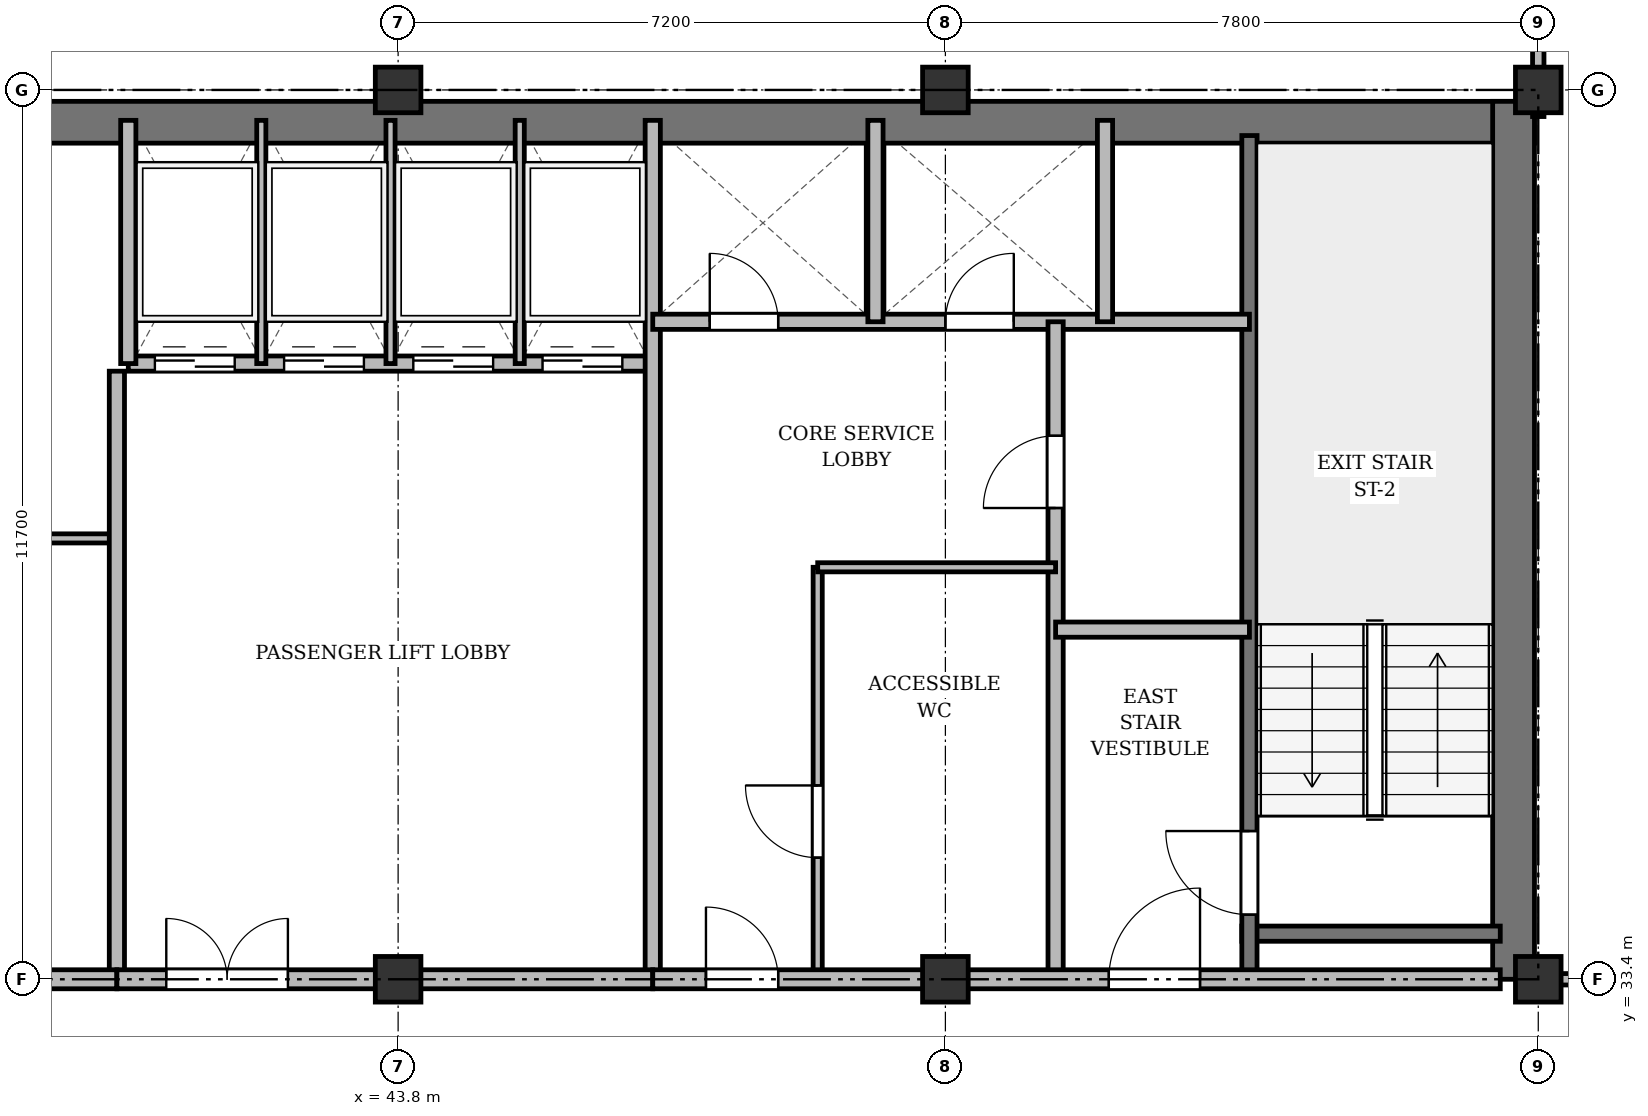
"""IFC4 building model, lengths in metres.
Left out: names, types, materials, properties, quantities, classifications, styles, units other than length and angle.
Written with IfcOpenShell. Run it as: python <this file> out.ifc"""

import sys

from ifc_helpers import new_model, si_unit, direction, frame, frame_2d, origin, origin_2d, place, context, subcontext, project, spatial, rectangle, extrude, source, transform, mapped, element, fill, save


model = new_model("IFC4")
c1 = context("Model", 3, precision=1e-05, world=origin(), true_north=direction((0.0, 1.0)))
c2 = subcontext(c1, "Body", "Model", "MODEL_VIEW")
j1 = project(units=[si_unit("LENGTHUNIT", "METRE"), si_unit("PLANEANGLEUNIT", "RADIAN")], contexts=[c1])
p1 = place(None, origin())
s1 = spatial("IfcSite", under=j1, at=p1, CompositionType="ELEMENT")
p2 = place(p1, origin())
s2 = spatial("IfcBuilding", under=s1, at=p2, CompositionType="ELEMENT")
p3 = place(p2, frame((0.0, 0.0, 248.7)))
s3 = spatial("IfcBuildingStorey", under=s2, at=p3, CompositionType="ELEMENT", Elevation=248.7)
m1 = source(origin(), c2, "Body", "SweptSolid", [
    extrude(rectangle(XDim=0.6, YDim=0.6, at=origin_2d()), origin(), (0.0, 0.0, 1.0), 3.6),
])
for number, where, z_axis, x_axis in (
    (1, (43.8, 33.4, 0.0), (0.0, 0.0, 1.0), (1.0, 0.0, 0.0)),
    (2, (43.8, 45.1, 0.0), (0.0, 0.0, 1.0), (1.0, 0.0, 0.0)),
    (3, (51.0, 33.4, 0.0), (0.0, 0.0, 1.0), (1.0, 0.0, 0.0)),
    (4, (51.0, 45.1, 0.0), (0.0, 0.0, 1.0), (1.0, 0.0, 0.0)),
    (5, (58.8, 33.4, 0.0), (0.0, 0.0, 1.0), (1.0, 0.0, 0.0)),
    (6, (58.8, 45.1, 0.0), (0.0, 0.0, 1.0), (1.0, 0.0, 0.0)),
):
    element("IfcColumn", number, at=place(p3, frame(where, z_axis=z_axis, x_axis=x_axis)), inside=s3, PredefinedType="COLUMN", context=c2, shape_type="MappedRepresentation", body=[
        mapped(m1, transform((0.0, 0.0, 0.0), x_axis=(1.0, 0.0, 0.0), y_axis=(0.0, 1.0, 0.0), z_axis=(0.0, 0.0, 1.0), scale=1.0)),
    ])
p4 = place(p3, frame((15.65, 44.675, 0.0), z_axis=(0.0, 0.0, 1.0), x_axis=(1.0, 0.0, 0.0)))
e7 = element("IfcWall", 7, at=p4, inside=s3, PredefinedType="SHEAR", context=c2, shape_type="SweptSolid", body=[
    extrude(rectangle(XDim=43.1, YDim=0.55, at=frame_2d((21.55, 0.0))), origin(), (0.0, 0.0, 1.0), 3.37),
])
p5 = place(p3, frame((58.475, 33.4, 0.0), z_axis=(0.0, 0.0, 1.0), x_axis=(0.0, 1.0, 0.0)))
e8 = element("IfcWall", 8, at=p5, inside=s3, PredefinedType="SHEAR", context=c2, shape_type="SweptSolid", body=[
    extrude(rectangle(XDim=11.55, YDim=0.55, at=frame_2d((5.775, 0.0))), origin(), (0.0, 0.0, 1.0), 3.37),
])
p6 = place(p3, frame((54.9, 34.0, 0.0), z_axis=(0.0, 0.0, 1.0), x_axis=(1.0, 0.0, 0.0)))
e9 = element("IfcWall", 9, at=p6, inside=s3, PredefinedType="SHEAR", context=c2, shape_type="SweptSolid", body=[
    extrude(rectangle(XDim=3.4, YDim=0.2, at=frame_2d((1.7, 0.0))), origin(), (0.0, 0.0, 1.0), 3.37),
])
p7 = place(p3, frame((55.0, 33.4, 0.0), z_axis=(0.0, 0.0, 1.0), x_axis=(0.0, 1.0, 0.0)))
e10 = element("IfcWall", 10, at=p7, inside=s3, PredefinedType="SHEAR", context=c2, shape_type="SweptSolid", body=[
    extrude(rectangle(XDim=11.1, YDim=0.2, at=frame_2d((5.55, 0.0))), origin(), (0.0, 0.0, 1.0), 3.37),
])
p8 = place(p7, frame((0.85, 0.0, 0.0)))
e11 = element("IfcOpeningElement", 11, at=p8, cuts=e10, PredefinedType="OPENING", context=c2, shape_type="SweptSolid", body=[
    extrude(rectangle(XDim=1.1, YDim=2.15, at=frame_2d((0.55, 1.075))), frame((0.0, 0.11, 0.0), z_axis=(0.0, -1.0, 0.0), x_axis=(1.0, 0.0, 0.0)), (0.0, 0.0, 1.0), 0.22),
])
p9 = place(p3, frame((33.3, 39.2, 0.0), z_axis=(0.0, 0.0, 1.0), x_axis=(1.0, 0.0, 0.0)))
e12 = element("IfcWall", 12, at=p9, inside=s3, PredefinedType="PARTITIONING", context=c2, shape_type="SweptSolid", body=[
    extrude(rectangle(XDim=6.8, YDim=0.12, at=frame_2d((3.4, 0.0))), origin(), (0.0, 0.0, 1.0), 3.37),
])
p10 = place(p9, frame((2.6, 0.0, 0.0)))
e13 = element("IfcOpeningElement", 13, at=p10, cuts=e12, PredefinedType="OPENING", context=c2, shape_type="SweptSolid", body=[
    extrude(rectangle(XDim=0.95, YDim=2.15, at=frame_2d((0.475, 1.075))), frame((0.0, 0.07, 0.0), z_axis=(0.0, -1.0, 0.0), x_axis=(1.0, 0.0, 0.0)), (0.0, 0.0, 1.0), 0.14),
])
p11 = place(p3, frame((40.1, 33.4, 0.0), z_axis=(0.0, 0.0, 1.0), x_axis=(0.0, 1.0, 0.0)))
e14 = element("IfcWall", 14, at=p11, inside=s3, PredefinedType="SOLIDWALL", context=c2, shape_type="SweptSolid", body=[
    extrude(rectangle(XDim=8.0, YDim=0.2, at=frame_2d((4.0, 0.0))), origin(), (0.0, 0.0, 1.0), 2.92),
])
p12 = place(p3, frame((40.25, 41.5, 0.0), z_axis=(0.0, 0.0, 1.0), x_axis=(1.0, 0.0, 0.0)))
e15 = element("IfcWall", 15, at=p12, inside=s3, PredefinedType="SOLIDWALL", context=c2, shape_type="SweptSolid", body=[
    extrude(rectangle(XDim=6.9, YDim=0.2, at=frame_2d((3.45, 0.0))), origin(), (0.0, 0.0, 1.0), 3.37),
])
p13 = place(p12, frame((0.35, 0.0, 0.0)))
e16 = element("IfcOpeningElement", 16, at=p13, cuts=e15, PredefinedType="OPENING", context=c2, shape_type="SweptSolid", body=[
    extrude(rectangle(XDim=1.05, YDim=2.15, at=frame_2d((0.525, 1.075))), frame((0.0, 0.11, 0.0), z_axis=(0.0, -1.0, 0.0), x_axis=(1.0, 0.0, 0.0)), (0.0, 0.0, 1.0), 0.22),
])
p14 = place(p12, frame((2.05, 0.0, 0.0)))
e17 = element("IfcOpeningElement", 17, at=p14, cuts=e15, PredefinedType="OPENING", context=c2, shape_type="SweptSolid", body=[
    extrude(rectangle(XDim=1.05, YDim=2.15, at=frame_2d((0.525, 1.075))), frame((0.0, 0.11, 0.0), z_axis=(0.0, -1.0, 0.0), x_axis=(1.0, 0.0, 0.0)), (0.0, 0.0, 1.0), 0.22),
])
p15 = place(p12, frame((3.75, 0.0, 0.0)))
e18 = element("IfcOpeningElement", 18, at=p15, cuts=e15, PredefinedType="OPENING", context=c2, shape_type="SweptSolid", body=[
    extrude(rectangle(XDim=1.05, YDim=2.15, at=frame_2d((0.525, 1.075))), frame((0.0, 0.11, 0.0), z_axis=(0.0, -1.0, 0.0), x_axis=(1.0, 0.0, 0.0)), (0.0, 0.0, 1.0), 0.22),
])
p16 = place(p12, frame((5.45, 0.0, 0.0)))
e19 = element("IfcOpeningElement", 19, at=p16, cuts=e15, PredefinedType="OPENING", context=c2, shape_type="SweptSolid", body=[
    extrude(rectangle(XDim=1.05, YDim=2.15, at=frame_2d((0.525, 1.075))), frame((0.0, 0.11, 0.0), z_axis=(0.0, -1.0, 0.0), x_axis=(1.0, 0.0, 0.0)), (0.0, 0.0, 1.0), 0.22),
])
p17 = place(p3, frame((40.25, 41.5, 0.0), z_axis=(0.0, 0.0, 1.0), x_axis=(0.0, 1.0, 0.0)))
e20 = element("IfcWall", 20, at=p17, inside=s3, PredefinedType="SOLIDWALL", context=c2, shape_type="SweptSolid", body=[
    extrude(rectangle(XDim=3.2, YDim=0.2, at=frame_2d((1.6, 0.0))), origin(), (0.0, 0.0, 1.0), 3.37),
])
for number, where, z_axis, x_axis in (
    (21, (42.0, 41.5, 0.0), (0.0, 0.0, 1.0), (0.0, 1.0, 0.0)),
    (22, (43.7, 41.5, 0.0), (0.0, 0.0, 1.0), (0.0, 1.0, 0.0)),
    (23, (45.4, 41.5, 0.0), (0.0, 0.0, 1.0), (0.0, 1.0, 0.0)),
):
    element("IfcWall", number, at=place(p3, frame(where, z_axis=z_axis, x_axis=x_axis)), inside=s3, PredefinedType="PARTITIONING", context=c2, shape_type="SweptSolid", body=[
        extrude(rectangle(XDim=3.2, YDim=0.12, at=frame_2d((1.6, 0.0))), origin(), (0.0, 0.0, 1.0), 3.37),
    ])
p18 = place(p3, frame((47.15, 33.4, 0.0), z_axis=(0.0, 0.0, 1.0), x_axis=(0.0, 1.0, 0.0)))
e24 = element("IfcWall", 24, at=p18, inside=s3, PredefinedType="SOLIDWALL", context=c2, shape_type="SweptSolid", body=[
    extrude(rectangle(XDim=11.3, YDim=0.2, at=frame_2d((5.65, 0.0))), origin(), (0.0, 0.0, 1.0), 2.92),
])
p19 = place(p3, frame((33.3, 33.4, 0.0), z_axis=(0.0, 0.0, 1.0), x_axis=(1.0, 0.0, 0.0)))
e25 = element("IfcWall", 25, at=p19, inside=s3, PredefinedType="PARTITIONING", context=c2, shape_type="SweptSolid", body=[
    extrude(rectangle(XDim=6.8, YDim=0.25, at=frame_2d((3.4, 0.0))), origin(), (0.0, 0.0, 1.0), 2.92),
])
p20 = place(p19, frame((2.4, 0.0, 0.0)))
e26 = element("IfcOpeningElement", 26, at=p20, cuts=e25, PredefinedType="OPENING", context=c2, shape_type="SweptSolid", body=[
    extrude(rectangle(XDim=1.0, YDim=2.15, at=frame_2d((0.5, 1.075))), frame((0.0, 0.135, 0.0), z_axis=(0.0, -1.0, 0.0), x_axis=(1.0, 0.0, 0.0)), (0.0, 0.0, 1.0), 0.27),
])
p21 = place(p3, frame((40.1, 33.4, 0.0), z_axis=(0.0, 0.0, 1.0), x_axis=(1.0, 0.0, 0.0)))
e27 = element("IfcWall", 27, at=p21, inside=s3, PredefinedType="PARTITIONING", context=c2, shape_type="SweptSolid", body=[
    extrude(rectangle(XDim=7.05, YDim=0.25, at=frame_2d((3.525, 0.0))), origin(), (0.0, 0.0, 1.0), 2.92),
])
p22 = place(p21, frame((0.65, 0.0, 0.0)))
e28 = element("IfcOpeningElement", 28, at=p22, cuts=e27, PredefinedType="OPENING", context=c2, shape_type="SweptSolid", body=[
    extrude(rectangle(XDim=1.6, YDim=2.2, at=frame_2d((0.8, 1.1))), frame((0.0, 0.135, 0.0), z_axis=(0.0, -1.0, 0.0), x_axis=(1.0, 0.0, 0.0)), (0.0, 0.0, 1.0), 0.27),
])
p23 = place(p3, frame((47.15, 42.05, 0.0), z_axis=(0.0, 0.0, 1.0), x_axis=(1.0, 0.0, 0.0)))
e29 = element("IfcWall", 29, at=p23, inside=s3, PredefinedType="SOLIDWALL", context=c2, shape_type="SweptSolid", body=[
    extrude(rectangle(XDim=7.85, YDim=0.2, at=frame_2d((3.925, 0.0))), origin(), (0.0, 0.0, 1.0), 2.87),
])
p24 = place(p23, frame((0.75, 0.0, 0.0)))
e30 = element("IfcOpeningElement", 30, at=p24, cuts=e29, PredefinedType="OPENING", context=c2, shape_type="SweptSolid", body=[
    extrude(rectangle(XDim=0.9, YDim=2.1, at=frame_2d((0.45, 1.05))), frame((0.0, 0.11, 0.0), z_axis=(0.0, -1.0, 0.0), x_axis=(1.0, 0.0, 0.0)), (0.0, 0.0, 1.0), 0.22),
])
p25 = place(p23, frame((3.85, 0.0, 0.0)))
e31 = element("IfcOpeningElement", 31, at=p25, cuts=e29, PredefinedType="OPENING", context=c2, shape_type="SweptSolid", body=[
    extrude(rectangle(XDim=0.9, YDim=2.1, at=frame_2d((0.45, 1.05))), frame((0.0, 0.11, 0.0), z_axis=(0.0, -1.0, 0.0), x_axis=(1.0, 0.0, 0.0)), (0.0, 0.0, 1.0), 0.22),
])
for number, where, z_axis, x_axis in (
    (32, (50.08, 42.05, 0.0), (0.0, 0.0, 1.0), (0.0, 1.0, 0.0)),
    (33, (53.1, 42.05, 0.0), (0.0, 0.0, 1.0), (0.0, 1.0, 0.0)),
):
    element("IfcWall", number, at=place(p3, frame(where, z_axis=z_axis, x_axis=x_axis)), inside=s3, PredefinedType="SOLIDWALL", context=c2, shape_type="SweptSolid", body=[
        extrude(rectangle(XDim=2.65, YDim=0.2, at=frame_2d((1.325, 0.0))), origin(), (0.0, 0.0, 1.0), 3.37),
    ])
p26 = place(p3, frame((52.45, 33.4, 0.0), z_axis=(0.0, 0.0, 1.0), x_axis=(0.0, 1.0, 0.0)))
e34 = element("IfcWall", 34, at=p26, inside=s3, PredefinedType="PARTITIONING", context=c2, shape_type="SweptSolid", body=[
    extrude(rectangle(XDim=8.65, YDim=0.2, at=frame_2d((4.325, 0.0))), origin(), (0.0, 0.0, 1.0), 2.92),
])
p27 = place(p26, frame((6.2, 0.0, 0.0)))
e35 = element("IfcOpeningElement", 35, at=p27, cuts=e34, PredefinedType="OPENING", context=c2, shape_type="SweptSolid", body=[
    extrude(rectangle(XDim=0.95, YDim=2.15, at=frame_2d((0.475, 1.075))), frame((0.0, 0.11, 0.0), z_axis=(0.0, -1.0, 0.0), x_axis=(1.0, 0.0, 0.0)), (0.0, 0.0, 1.0), 0.22),
])
p28 = place(p3, frame((52.45, 38.0, 0.0), z_axis=(0.0, 0.0, 1.0), x_axis=(1.0, 0.0, 0.0)))
e36 = element("IfcWall", 36, at=p28, inside=s3, PredefinedType="PARTITIONING", context=c2, shape_type="SweptSolid", body=[
    extrude(rectangle(XDim=2.55, YDim=0.2, at=frame_2d((1.275, 0.0))), origin(), (0.0, 0.0, 1.0), 3.37),
])
p29 = place(p3, frame((49.32, 33.4, 0.0), z_axis=(0.0, 0.0, 1.0), x_axis=(0.0, 1.0, 0.0)))
e37 = element("IfcWall", 37, at=p29, inside=s3, PredefinedType="PARTITIONING", context=c2, shape_type="SweptSolid", body=[
    extrude(rectangle(XDim=5.42, YDim=0.12, at=frame_2d((2.71, 0.0))), origin(), (0.0, 0.0, 1.0), 2.92),
])
p30 = place(p29, frame((1.6, 0.0, 0.0)))
e38 = element("IfcOpeningElement", 38, at=p30, cuts=e37, PredefinedType="OPENING", context=c2, shape_type="SweptSolid", body=[
    extrude(rectangle(XDim=0.95, YDim=2.15, at=frame_2d((0.475, 1.075))), frame((0.0, 0.07, 0.0), z_axis=(0.0, -1.0, 0.0), x_axis=(1.0, 0.0, 0.0)), (0.0, 0.0, 1.0), 0.14),
])
p31 = place(p3, frame((49.32, 38.82, 0.0), z_axis=(0.0, 0.0, 1.0), x_axis=(1.0, 0.0, 0.0)))
e39 = element("IfcWall", 39, at=p31, inside=s3, PredefinedType="PARTITIONING", context=c2, shape_type="SweptSolid", body=[
    extrude(rectangle(XDim=3.13, YDim=0.12, at=frame_2d((1.565, 0.0))), origin(), (0.0, 0.0, 1.0), 2.87),
])
p32 = place(p3, frame((47.15, 33.4, 0.0), z_axis=(0.0, 0.0, 1.0), x_axis=(1.0, 0.0, 0.0)))
e40 = element("IfcWall", 40, at=p32, inside=s3, PredefinedType="PARTITIONING", context=c2, shape_type="SweptSolid", body=[
    extrude(rectangle(XDim=11.15, YDim=0.25, at=frame_2d((5.575, 0.0))), origin(), (0.0, 0.0, 1.0), 2.92),
])
p33 = place(p32, frame((0.7, 0.0, 0.0)))
e41 = element("IfcOpeningElement", 41, at=p33, cuts=e40, PredefinedType="OPENING", context=c2, shape_type="SweptSolid", body=[
    extrude(rectangle(XDim=0.95, YDim=2.15, at=frame_2d((0.475, 1.075))), frame((0.0, 0.135, 0.0), z_axis=(0.0, -1.0, 0.0), x_axis=(1.0, 0.0, 0.0)), (0.0, 0.0, 1.0), 0.27),
])
p34 = place(p32, frame((6.0, 0.0, 0.0)))
e42 = element("IfcOpeningElement", 42, at=p34, cuts=e40, PredefinedType="OPENING", context=c2, shape_type="SweptSolid", body=[
    extrude(rectangle(XDim=1.2, YDim=2.15, at=frame_2d((0.6, 1.075))), frame((0.0, 0.135, 0.0), z_axis=(0.0, -1.0, 0.0), x_axis=(1.0, 0.0, 0.0)), (0.0, 0.0, 1.0), 0.27),
])
p35 = place(p3, frame((58.8, 33.4, 0.0), z_axis=(0.0, 0.0, 1.0), x_axis=(1.0, 0.0, 0.0)))
e43 = element("IfcWall", 43, at=p35, inside=s3, PredefinedType="PARTITIONING", context=c2, shape_type="SweptSolid", body=[
    extrude(rectangle(XDim=7.15, YDim=0.15, at=frame_2d((3.575, 0.0))), origin(), (0.0, 0.0, 1.0), 2.92),
])
p36 = place(p35, frame((3.0, 0.0, 0.0)))
e44 = element("IfcOpeningElement", 44, at=p36, cuts=e43, PredefinedType="OPENING", context=c2, shape_type="SweptSolid", body=[
    extrude(rectangle(XDim=0.95, YDim=2.15, at=frame_2d((0.475, 1.075))), frame((0.0, 0.085, 0.0), z_axis=(0.0, -1.0, 0.0), x_axis=(1.0, 0.0, 0.0)), (0.0, 0.0, 1.0), 0.17),
])
p37 = place(p3, frame((58.8, 44.75, 0.0), z_axis=(0.0, 0.0, 1.0), x_axis=(0.0, 1.0, 0.0)))
e45 = element("IfcWall", 45, at=p37, inside=s3, PredefinedType="PARTITIONING", context=c2, shape_type="SweptSolid", body=[
    extrude(rectangle(XDim=3.61, YDim=0.15, at=frame_2d((1.805, 0.0))), origin(), (0.0, 0.0, 1.0), 2.87),
])
p38 = place(p37, frame((1.1, 0.0, 0.0)))
e46 = element("IfcOpeningElement", 46, at=p38, cuts=e45, PredefinedType="OPENING", context=c2, shape_type="SweptSolid", body=[
    extrude(rectangle(XDim=0.95, YDim=2.15, at=frame_2d((0.475, 1.075))), frame((0.0, 0.085, 0.0), z_axis=(0.0, -1.0, 0.0), x_axis=(1.0, 0.0, 0.0)), (0.0, 0.0, 1.0), 0.17),
])
m2 = source(origin(), c2, "Body", "SweptSolid", [
    extrude(rectangle(XDim=1.1, YDim=2.15, at=frame_2d((0.55, 1.075))), frame((0.0, 0.025, 0.0), z_axis=(0.0, -1.0, 0.0), x_axis=(1.0, 0.0, 0.0)), (0.0, 0.0, 1.0), 0.05),
])
p39 = place(p8, origin())
e47 = element("IfcDoor", 47, at=p39, inside=s3, OperationType="SINGLE_SWING_RIGHT", PredefinedType="DOOR", context=c2, shape_type="MappedRepresentation", body=[
    mapped(m2, transform((0.0, 0.0, 0.0), x_axis=(1.0, 0.0, 0.0), y_axis=(0.0, 1.0, 0.0), z_axis=(0.0, 0.0, 1.0), scale=1.0)),
])
fill(e11, e47)
m3 = source(origin(), c2, "Body", "SweptSolid", [
    extrude(rectangle(XDim=1.05, YDim=2.15, at=frame_2d((0.525, 1.075))), frame((0.0, 0.025, 0.0), z_axis=(0.0, -1.0, 0.0), x_axis=(1.0, 0.0, 0.0)), (0.0, 0.0, 1.0), 0.05),
])
p40 = place(p13, origin())
e48 = element("IfcDoor", 48, at=p40, inside=s3, OperationType="DOUBLE_DOOR_SLIDING", PredefinedType="DOOR", context=c2, shape_type="MappedRepresentation", body=[
    mapped(m3, transform((0.0, 0.0, 0.0), x_axis=(1.0, 0.0, 0.0), y_axis=(0.0, 1.0, 0.0), z_axis=(0.0, 0.0, 1.0), scale=1.0)),
])
fill(e16, e48)
p41 = place(p14, origin())
e49 = element("IfcDoor", 49, at=p41, inside=s3, OperationType="DOUBLE_DOOR_SLIDING", PredefinedType="DOOR", context=c2, shape_type="MappedRepresentation", body=[
    mapped(m3, transform((0.0, 0.0, 0.0), x_axis=(1.0, 0.0, 0.0), y_axis=(0.0, 1.0, 0.0), z_axis=(0.0, 0.0, 1.0), scale=1.0)),
])
fill(e17, e49)
p42 = place(p15, origin())
e50 = element("IfcDoor", 50, at=p42, inside=s3, OperationType="DOUBLE_DOOR_SLIDING", PredefinedType="DOOR", context=c2, shape_type="MappedRepresentation", body=[
    mapped(m3, transform((0.0, 0.0, 0.0), x_axis=(1.0, 0.0, 0.0), y_axis=(0.0, 1.0, 0.0), z_axis=(0.0, 0.0, 1.0), scale=1.0)),
])
fill(e18, e50)
p43 = place(p16, origin())
e51 = element("IfcDoor", 51, at=p43, inside=s3, OperationType="DOUBLE_DOOR_SLIDING", PredefinedType="DOOR", context=c2, shape_type="MappedRepresentation", body=[
    mapped(m3, transform((0.0, 0.0, 0.0), x_axis=(1.0, 0.0, 0.0), y_axis=(0.0, 1.0, 0.0), z_axis=(0.0, 0.0, 1.0), scale=1.0)),
])
fill(e19, e51)
m4 = source(origin(), c2, "Body", "SweptSolid", [
    extrude(rectangle(XDim=1.6, YDim=2.2, at=frame_2d((0.8, 1.1))), frame((0.0, 0.025, 0.0), z_axis=(0.0, -1.0, 0.0), x_axis=(1.0, 0.0, 0.0)), (0.0, 0.0, 1.0), 0.05),
])
p44 = place(p22, origin())
e52 = element("IfcDoor", 52, at=p44, inside=s3, OperationType="DOUBLE_DOOR_SINGLE_SWING", PredefinedType="DOOR", context=c2, shape_type="MappedRepresentation", body=[
    mapped(m4, transform((0.0, 0.0, 0.0), x_axis=(1.0, 0.0, 0.0), y_axis=(0.0, 1.0, 0.0), z_axis=(0.0, 0.0, 1.0), scale=1.0)),
])
fill(e28, e52)
m5 = source(origin(), c2, "Body", "SweptSolid", [
    extrude(rectangle(XDim=0.9, YDim=2.1, at=frame_2d((0.45, 1.05))), frame((0.0, 0.025, 0.0), z_axis=(0.0, -1.0, 0.0), x_axis=(1.0, 0.0, 0.0)), (0.0, 0.0, 1.0), 0.05),
])
p45 = place(p24, origin())
e53 = element("IfcDoor", 53, at=p45, inside=s3, OperationType="SINGLE_SWING_LEFT", PredefinedType="DOOR", context=c2, shape_type="MappedRepresentation", body=[
    mapped(m5, transform((0.0, 0.0, 0.0), x_axis=(1.0, 0.0, 0.0), y_axis=(0.0, 1.0, 0.0), z_axis=(0.0, 0.0, 1.0), scale=1.0)),
])
fill(e30, e53)
p46 = place(p25, origin())
e54 = element("IfcDoor", 54, at=p46, inside=s3, OperationType="SINGLE_SWING_RIGHT", PredefinedType="DOOR", context=c2, shape_type="MappedRepresentation", body=[
    mapped(m5, transform((0.0, 0.0, 0.0), x_axis=(1.0, 0.0, 0.0), y_axis=(0.0, 1.0, 0.0), z_axis=(0.0, 0.0, 1.0), scale=1.0)),
])
fill(e31, e54)
m6 = source(origin(), c2, "Body", "SweptSolid", [
    extrude(rectangle(XDim=0.95, YDim=2.15, at=frame_2d((0.475, 1.075))), frame((0.0, 0.025, 0.0), z_axis=(0.0, -1.0, 0.0), x_axis=(1.0, 0.0, 0.0)), (0.0, 0.0, 1.0), 0.05),
])
p47 = place(p27, origin())
e55 = element("IfcDoor", 55, at=p47, inside=s3, OperationType="SINGLE_SWING_LEFT", PredefinedType="DOOR", context=c2, shape_type="MappedRepresentation", body=[
    mapped(m6, transform((0.0, 0.0, 0.0), x_axis=(1.0, 0.0, 0.0), y_axis=(0.0, 1.0, 0.0), z_axis=(0.0, 0.0, 1.0), scale=1.0)),
])
fill(e35, e55)
p48 = place(p30, origin())
e56 = element("IfcDoor", 56, at=p48, inside=s3, OperationType="SINGLE_SWING_RIGHT", PredefinedType="DOOR", context=c2, shape_type="MappedRepresentation", body=[
    mapped(m6, transform((0.0, 0.0, 0.0), x_axis=(1.0, 0.0, 0.0), y_axis=(0.0, 1.0, 0.0), z_axis=(0.0, 0.0, 1.0), scale=1.0)),
])
fill(e38, e56)
p49 = place(p33, origin())
e57 = element("IfcDoor", 57, at=p49, inside=s3, OperationType="SINGLE_SWING_LEFT", PredefinedType="DOOR", context=c2, shape_type="MappedRepresentation", body=[
    mapped(m6, transform((0.0, 0.0, 0.0), x_axis=(1.0, 0.0, 0.0), y_axis=(0.0, 1.0, 0.0), z_axis=(0.0, 0.0, 1.0), scale=1.0)),
])
fill(e41, e57)
m7 = source(origin(), c2, "Body", "SweptSolid", [
    extrude(rectangle(XDim=1.2, YDim=2.15, at=frame_2d((0.6, 1.075))), frame((0.0, 0.025, 0.0), z_axis=(0.0, -1.0, 0.0), x_axis=(1.0, 0.0, 0.0)), (0.0, 0.0, 1.0), 0.05),
])
p50 = place(p34, origin())
e58 = element("IfcDoor", 58, at=p50, inside=s3, OperationType="SINGLE_SWING_RIGHT", PredefinedType="DOOR", context=c2, shape_type="MappedRepresentation", body=[
    mapped(m7, transform((0.0, 0.0, 0.0), x_axis=(1.0, 0.0, 0.0), y_axis=(0.0, 1.0, 0.0), z_axis=(0.0, 0.0, 1.0), scale=1.0)),
])
fill(e42, e58)
save(model, sys.argv[1])
